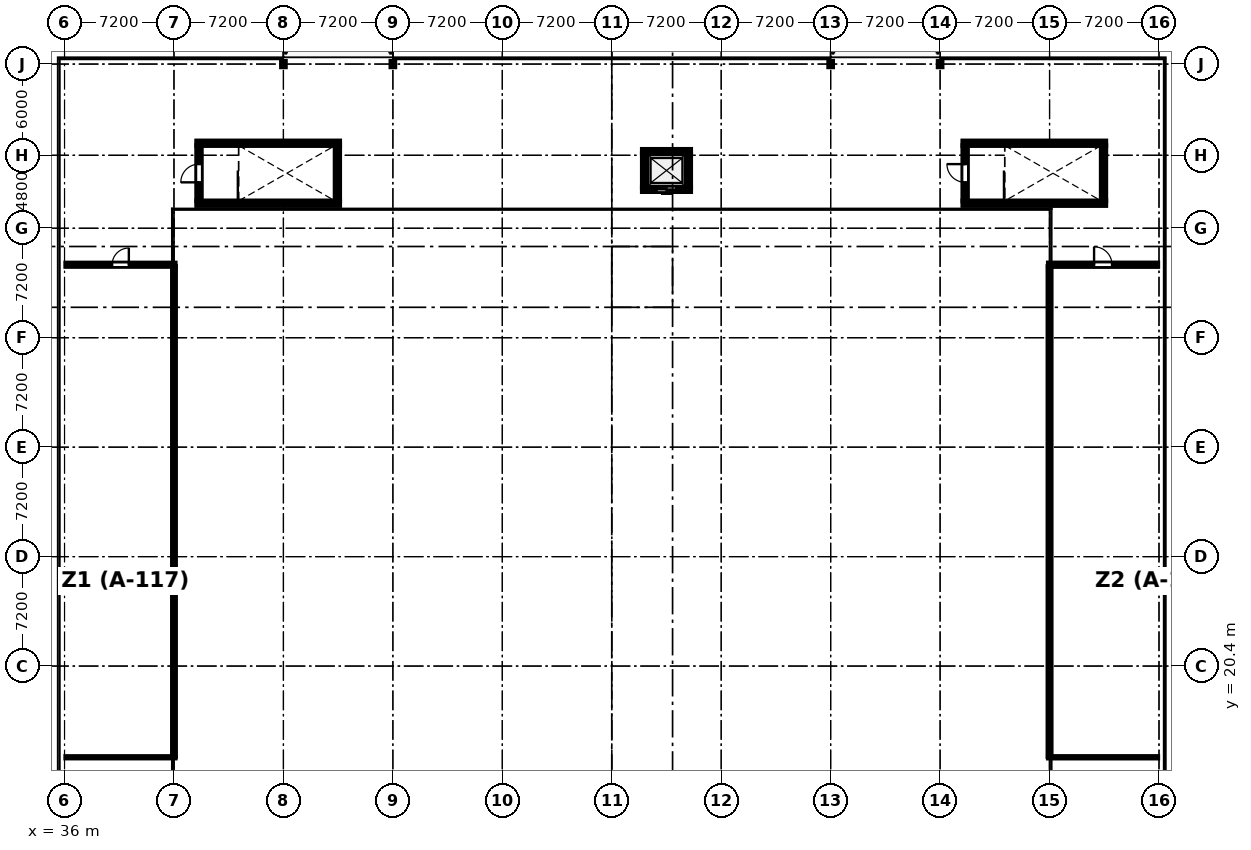
"""IFC4 building model, lengths in metres.
Left out: names, types, materials, properties, quantities, classifications, styles, units other than length and angle.
Written with IfcOpenShell. Run it as: python <this file> out.ifc"""

import sys

from ifc_helpers import new_model, si_unit, direction, frame, frame_2d, origin, origin_2d, place, context, subcontext, project, spatial, rectangle, i_section, extrude, element, fill, save


model = new_model("IFC4")
c1 = context("Model", 3, precision=1e-05, world=origin(), true_north=direction((0.0, 1.0)))
c2 = subcontext(c1, "Body", "Model", "MODEL_VIEW")
j1 = project(units=[si_unit("LENGTHUNIT", "METRE"), si_unit("PLANEANGLEUNIT", "RADIAN")], contexts=[c1])
p1 = place(None, origin())
s1 = spatial("IfcSite", under=j1, at=p1, CompositionType="ELEMENT")
p2 = place(p1, origin())
s2 = spatial("IfcBuilding", under=s1, at=p2, CompositionType="ELEMENT")
p3 = place(p2, frame((0.0, 0.0, 5.4)))
s3 = spatial("IfcBuildingStorey", under=s2, at=p3, CompositionType="ELEMENT", Elevation=5.4)
for number, where, z_axis, x_axis in (
    (1, (50.4, 60.0, 0.6), (0.0, 0.0, 1.0), (1.0, 0.0, 0.0)),
    (2, (57.6, 60.0, 0.6), (0.0, 0.0, 1.0), (1.0, 0.0, 0.0)),
    (3, (86.4, 60.0, 0.6), (0.0, 0.0, 1.0), (1.0, 0.0, 0.0)),
    (4, (93.6, 60.0, 0.6), (0.0, 0.0, 1.0), (1.0, 0.0, 0.0)),
):
    element("IfcColumn", number, at=place(p3, frame(where, z_axis=z_axis, x_axis=x_axis)), inside=s3, PredefinedType="COLUMN", context=c2, shape_type="SweptSolid", body=[
        extrude(i_section(OverallWidth=0.257, OverallDepth=0.363, WebThickness=0.013, FlangeThickness=0.022, FilletRadius=0.015, at=origin_2d()), origin(), (0.0, 0.0, 1.0), 2.6),
    ])
for number, where, z_axis, x_axis in (
    (5, (54.1, 50.85, 0.0), (0.0, 0.0, 1.0), (-1.0, 0.0, 0.0)),
    (6, (44.7, 54.79, 0.0), (0.0, 0.0, 1.0), (1.0, 0.0, 0.0)),
):
    element("IfcWall", number, at=place(p3, frame(where, z_axis=z_axis, x_axis=x_axis)), inside=s3, PredefinedType="SOLIDWALL", context=c2, shape_type="SweptSolid", body=[
        extrude(rectangle(XDim=9.4, YDim=0.3, at=frame_2d((4.7, 0.0))), origin(), (0.0, 0.0, 1.0), 3.2),
    ])
p4 = place(p3, frame((44.85, 51.0, 0.0), z_axis=(0.0, 0.0, 1.0), x_axis=(0.0, 1.0, 0.0)))
e7 = element("IfcWall", 7, at=p4, inside=s3, PredefinedType="SOLIDWALL", context=c2, shape_type="SweptSolid", body=[
    extrude(rectangle(XDim=3.64, YDim=0.3, at=frame_2d((1.82, 0.0))), origin(), (0.0, 0.0, 1.0), 3.2),
])
p5 = place(p4, frame((1.22, 0.0, 0.0)))
e8 = element("IfcOpeningElement", 8, at=p5, cuts=e7, PredefinedType="OPENING", context=c2, shape_type="SweptSolid", body=[
    extrude(rectangle(XDim=1.2, YDim=2.2, at=frame_2d((0.6, 1.1))), frame((0.0, 0.16, 0.0), z_axis=(0.0, -1.0, 0.0), x_axis=(1.0, 0.0, 0.0)), (0.0, 0.0, 1.0), 0.32),
])
p6 = place(p3, frame((53.95, 54.64, 0.0), z_axis=(0.0, 0.0, 1.0), x_axis=(0.0, -1.0, 0.0)))
e9 = element("IfcWall", 9, at=p6, inside=s3, PredefinedType="SOLIDWALL", context=c2, shape_type="SweptSolid", body=[
    extrude(rectangle(XDim=3.64, YDim=0.3, at=frame_2d((1.82, 0.0))), origin(), (0.0, 0.0, 1.0), 3.2),
])
for number, where, z_axis, x_axis in (
    (10, (104.5, 50.85, 0.0), (0.0, 0.0, 1.0), (-1.0, 0.0, 0.0)),
    (11, (95.1, 54.79, 0.0), (0.0, 0.0, 1.0), (1.0, 0.0, 0.0)),
):
    element("IfcWall", number, at=place(p3, frame(where, z_axis=z_axis, x_axis=x_axis)), inside=s3, PredefinedType="SOLIDWALL", context=c2, shape_type="SweptSolid", body=[
        extrude(rectangle(XDim=9.4, YDim=0.3, at=frame_2d((4.7, 0.0))), origin(), (0.0, 0.0, 1.0), 3.2),
    ])
p7 = place(p3, frame((95.25, 51.0, 0.0), z_axis=(0.0, 0.0, 1.0), x_axis=(0.0, 1.0, 0.0)))
e12 = element("IfcWall", 12, at=p7, inside=s3, PredefinedType="SOLIDWALL", context=c2, shape_type="SweptSolid", body=[
    extrude(rectangle(XDim=3.64, YDim=0.3, at=frame_2d((1.82, 0.0))), origin(), (0.0, 0.0, 1.0), 3.2),
])
p8 = place(p7, frame((1.22, 0.0, 0.0)))
e13 = element("IfcOpeningElement", 13, at=p8, cuts=e12, PredefinedType="OPENING", context=c2, shape_type="SweptSolid", body=[
    extrude(rectangle(XDim=1.2, YDim=2.2, at=frame_2d((0.6, 1.1))), frame((0.0, 0.16, 0.0), z_axis=(0.0, -1.0, 0.0), x_axis=(1.0, 0.0, 0.0)), (0.0, 0.0, 1.0), 0.32),
])
p9 = place(p3, frame((104.35, 54.64, 0.0), z_axis=(0.0, 0.0, 1.0), x_axis=(0.0, -1.0, 0.0)))
e14 = element("IfcWall", 14, at=p9, inside=s3, PredefinedType="SOLIDWALL", context=c2, shape_type="SweptSolid", body=[
    extrude(rectangle(XDim=3.64, YDim=0.3, at=frame_2d((1.82, 0.0))), origin(), (0.0, 0.0, 1.0), 3.2),
])
p10 = place(p3, frame((77.19, 51.755, 0.0), z_axis=(0.0, 0.0, 1.0), x_axis=(-1.0, 0.0, 0.0)))
e15 = element("IfcWall", 15, at=p10, inside=s3, PredefinedType="SHEAR", context=c2, shape_type="SweptSolid", body=[
    extrude(rectangle(XDim=3.18, YDim=0.29, at=frame_2d((1.59, 0.0))), origin(), (0.0, 0.0, 1.0), 2.65),
])
p11 = place(p10, frame((0.94, 0.0, 0.0)))
e16 = element("IfcOpeningElement", 16, at=p11, cuts=e15, PredefinedType="OPENING", context=c2, shape_type="SweptSolid", body=[
    extrude(rectangle(XDim=1.3, YDim=2.2, at=frame_2d((0.65, 1.1))), frame((0.0, 0.155, 0.0), z_axis=(0.0, -1.0, 0.0), x_axis=(1.0, 0.0, 0.0)), (0.0, 0.0, 1.0), 0.31),
])
p12 = place(p3, frame((74.01, 54.245, 0.0), z_axis=(0.0, 0.0, 1.0), x_axis=(1.0, 0.0, 0.0)))
e17 = element("IfcWall", 17, at=p12, inside=s3, PredefinedType="SHEAR", context=c2, shape_type="SweptSolid", body=[
    extrude(rectangle(XDim=3.18, YDim=0.29, at=frame_2d((1.59, 0.0))), origin(), (0.0, 0.0, 1.0), 2.65),
])
for number, where, z_axis, x_axis in (
    (18, (74.155, 51.9, 0.0), (0.0, 0.0, 1.0), (0.0, 1.0, 0.0)),
    (19, (77.045, 54.1, 0.0), (0.0, 0.0, 1.0), (0.0, -1.0, 0.0)),
):
    element("IfcWall", number, at=place(p3, frame(where, z_axis=z_axis, x_axis=x_axis)), inside=s3, PredefinedType="SHEAR", context=c2, shape_type="SweptSolid", body=[
        extrude(rectangle(XDim=2.2, YDim=0.29, at=frame_2d((1.1, 0.0))), origin(), (0.0, 0.0, 1.0), 2.65),
    ])
p13 = place(p3, frame((36.082, 46.8, 0.0), z_axis=(0.0, 0.0, 1.0), x_axis=(1.0, 0.0, 0.0)))
e20 = element("IfcWall", 20, at=p13, inside=s3, PredefinedType="PARTITIONING", context=c2, shape_type="SweptSolid", body=[
    extrude(rectangle(XDim=7.198, YDim=0.225, at=frame_2d((3.599, 0.0))), origin(), (0.0, 0.0, 1.0), 2.83),
])
p14 = place(p13, frame((3.049, 0.0, 0.0)))
e21 = element("IfcOpeningElement", 21, at=p14, cuts=e20, PredefinedType="OPENING", context=c2, shape_type="SweptSolid", body=[
    extrude(rectangle(XDim=1.1, YDim=2.28, at=frame_2d((0.55, 1.14))), frame((0.0, 0.123, 0.0), z_axis=(0.0, -1.0, 0.0), x_axis=(1.0, 0.0, 0.0)), (0.0, 0.0, 1.0), 0.245),
])
p15 = place(p3, frame((100.72, 46.8, 0.0), z_axis=(0.0, 0.0, 1.0), x_axis=(1.0, 0.0, 0.0)))
e22 = element("IfcWall", 22, at=p15, inside=s3, PredefinedType="PARTITIONING", context=c2, shape_type="SweptSolid", body=[
    extrude(rectangle(XDim=7.198, YDim=0.235, at=frame_2d((3.599, 0.0))), origin(), (0.0, 0.0, 1.0), 2.83),
])
p16 = place(p15, frame((3.009, 0.0, 0.0)))
e23 = element("IfcOpeningElement", 23, at=p16, cuts=e22, PredefinedType="OPENING", context=c2, shape_type="SweptSolid", body=[
    extrude(rectangle(XDim=1.18, YDim=2.28, at=frame_2d((0.59, 1.14))), frame((0.0, 0.127, 0.0), z_axis=(0.0, -1.0, 0.0), x_axis=(1.0, 0.0, 0.0)), (0.0, 0.0, 1.0), 0.255),
])
p17 = place(p3, frame((43.28, 14.4, 0.0), z_axis=(0.0, 0.0, 1.0), x_axis=(-1.0, 0.0, 0.0)))
e24 = element("IfcWall", 24, at=p17, inside=s3, PredefinedType="PARTITIONING", context=c2, shape_type="SweptSolid", body=[
    extrude(rectangle(XDim=7.198, YDim=0.1, at=frame_2d((3.599, 0.0))), origin(), (0.0, 0.0, 1.0), 2.83),
])
p18 = place(p3, frame((107.918, 14.4, 0.0), z_axis=(0.0, 0.0, 1.0), x_axis=(-1.0, 0.0, 0.0)))
e25 = element("IfcWall", 25, at=p18, inside=s3, PredefinedType="PARTITIONING", context=c2, shape_type="SweptSolid", body=[
    extrude(rectangle(XDim=7.198, YDim=0.105, at=frame_2d((3.599, 0.0))), origin(), (0.0, 0.0, 1.0), 2.83),
])
p19 = place(p3, frame((43.2, 46.686, 0.0), z_axis=(0.0, 0.0, 1.0), x_axis=(0.0, -1.0, 0.0)))
e26 = element("IfcWall", 26, at=p19, inside=s3, PredefinedType="PARTITIONING", context=c2, shape_type="SweptSolid", body=[
    extrude(rectangle(XDim=32.234, YDim=0.205, at=frame_2d((16.117, 0.0))), origin(), (0.0, 0.0, 1.0), 2.83),
])
p20 = place(p3, frame((100.8, 14.455, 0.0), z_axis=(0.0, 0.0, 1.0), x_axis=(0.0, 1.0, 0.0)))
e27 = element("IfcWall", 27, at=p20, inside=s3, PredefinedType="PARTITIONING", context=c2, shape_type="SweptSolid", body=[
    extrude(rectangle(XDim=32.225, YDim=0.212, at=frame_2d((16.112, 0.0))), origin(), (0.0, 0.0, 1.0), 2.83),
])
p21 = place(p5, origin())
e28 = element("IfcDoor", 28, at=p21, inside=s3, OperationType="SINGLE_SWING_LEFT", PredefinedType="DOOR", context=c2, shape_type="SweptSolid", body=[
    extrude(rectangle(XDim=1.2, YDim=2.2, at=frame_2d((0.6, 1.1))), frame((0.0, 0.025, 0.0), z_axis=(0.0, -1.0, 0.0), x_axis=(1.0, 0.0, 0.0)), (0.0, 0.0, 1.0), 0.05),
])
fill(e8, e28)
p22 = place(p8, origin())
e29 = element("IfcDoor", 29, at=p22, inside=s3, OperationType="SINGLE_SWING_RIGHT", PredefinedType="DOOR", context=c2, shape_type="SweptSolid", body=[
    extrude(rectangle(XDim=1.2, YDim=2.2, at=frame_2d((0.6, 1.1))), frame((0.0, 0.025, 0.0), z_axis=(0.0, -1.0, 0.0), x_axis=(1.0, 0.0, 0.0)), (0.0, 0.0, 1.0), 0.05),
])
fill(e13, e29)
p23 = place(p11, origin())
e30 = element("IfcDoor", 30, at=p23, inside=s3, OperationType="DOUBLE_DOOR_SLIDING", PredefinedType="DOOR", context=c2, shape_type="SweptSolid", body=[
    extrude(rectangle(XDim=1.3, YDim=2.2, at=frame_2d((0.65, 1.1))), frame((0.0, 0.025, 0.0), z_axis=(0.0, -1.0, 0.0), x_axis=(1.0, 0.0, 0.0)), (0.0, 0.0, 1.0), 0.05),
])
fill(e16, e30)
p24 = place(p14, origin())
e31 = element("IfcDoor", 31, at=p24, inside=s3, OperationType="SINGLE_SWING_RIGHT", PredefinedType="DOOR", context=c2, shape_type="SweptSolid", body=[
    extrude(rectangle(XDim=1.1, YDim=2.28, at=frame_2d((0.55, 1.14))), frame((0.0, 0.025, 0.0), z_axis=(0.0, -1.0, 0.0), x_axis=(1.0, 0.0, 0.0)), (0.0, 0.0, 1.0), 0.05),
])
fill(e21, e31)
p25 = place(p16, origin())
e32 = element("IfcDoor", 32, at=p25, inside=s3, OperationType="SINGLE_SWING_LEFT", PredefinedType="DOOR", context=c2, shape_type="SweptSolid", body=[
    extrude(rectangle(XDim=1.18, YDim=2.28, at=frame_2d((0.59, 1.14))), frame((0.0, 0.025, 0.0), z_axis=(0.0, -1.0, 0.0), x_axis=(1.0, 0.0, 0.0)), (0.0, 0.0, 1.0), 0.05),
])
fill(e23, e32)
save(model, sys.argv[1])
